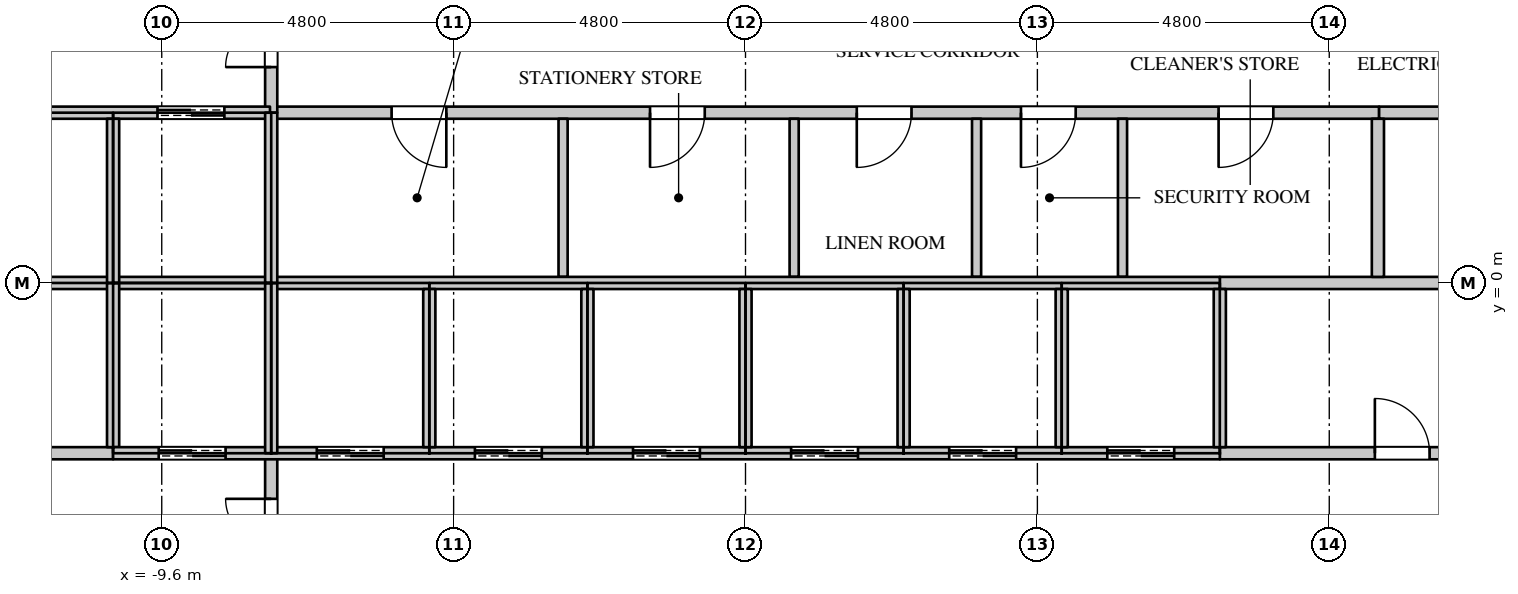
"""IFC4 building model, lengths in metres.
Left out: names, types, materials, properties, quantities, classifications, styles, units other than length and angle.
Written with IfcOpenShell. Run it as: python <this file> out.ifc"""

import sys

from ifc_helpers import new_model, si_unit, direction, frame, frame_2d, origin, place, context, subcontext, project, spatial, rectangle, extrude, element, fill, save


model = new_model("IFC4")
c1 = context("Model", 3, precision=1e-05, world=origin(), true_north=direction((0.0, 1.0)))
c2 = subcontext(c1, "Body", "Model", "MODEL_VIEW")
j1 = project(units=[si_unit("LENGTHUNIT", "METRE"), si_unit("PLANEANGLEUNIT", "RADIAN")], contexts=[c1])
p1 = place(None, origin())
s1 = spatial("IfcSite", under=j1, at=p1, CompositionType="ELEMENT")
p2 = place(p1, origin())
s2 = spatial("IfcBuilding", under=s1, at=p2, CompositionType="ELEMENT")
p3 = place(p2, frame((0.0, 0.0, 272.7)))
s3 = spatial("IfcBuildingStorey", under=s2, at=p3, CompositionType="ELEMENT", Elevation=272.7)
p4 = place(p3, frame((-7.82, 2.8, 0.0), z_axis=(0.0, 0.0, 1.0), x_axis=(1.0, 0.0, 0.0)))
e1 = element("IfcWall", 1, at=p4, inside=s3, PredefinedType="PARTITIONING", context=c2, shape_type="SweptSolid", body=[
    extrude(rectangle(XDim=18.24, YDim=0.2, at=frame_2d((9.12, 0.0))), origin(), (0.0, 0.0, 1.0), 3.95),
])
p5 = place(p4, frame((2.0, 0.0, 0.0)))
e2 = element("IfcOpeningElement", 2, at=p5, cuts=e1, PredefinedType="OPENING", context=c2, shape_type="SweptSolid", body=[
    extrude(rectangle(XDim=0.9, YDim=2.2, at=frame_2d((0.45, 1.1))), frame((0.0, 0.11, 0.0), z_axis=(0.0, -1.0, 0.0), x_axis=(1.0, 0.0, 0.0)), (0.0, 0.0, 1.0), 0.22),
])
p6 = place(p4, frame((6.25, 0.0, 0.0)))
e3 = element("IfcOpeningElement", 3, at=p6, cuts=e1, PredefinedType="OPENING", context=c2, shape_type="SweptSolid", body=[
    extrude(rectangle(XDim=0.9, YDim=2.2, at=frame_2d((0.45, 1.1))), frame((0.0, 0.11, 0.0), z_axis=(0.0, -1.0, 0.0), x_axis=(1.0, 0.0, 0.0)), (0.0, 0.0, 1.0), 0.22),
])
p7 = place(p4, frame((9.65, 0.0, 0.0)))
e4 = element("IfcOpeningElement", 4, at=p7, cuts=e1, PredefinedType="OPENING", context=c2, shape_type="SweptSolid", body=[
    extrude(rectangle(XDim=0.9, YDim=2.2, at=frame_2d((0.45, 1.1))), frame((0.0, 0.11, 0.0), z_axis=(0.0, -1.0, 0.0), x_axis=(1.0, 0.0, 0.0)), (0.0, 0.0, 1.0), 0.22),
])
p8 = place(p4, frame((12.35, 0.0, 0.0)))
e5 = element("IfcOpeningElement", 5, at=p8, cuts=e1, PredefinedType="OPENING", context=c2, shape_type="SweptSolid", body=[
    extrude(rectangle(XDim=0.9, YDim=2.2, at=frame_2d((0.45, 1.1))), frame((0.0, 0.11, 0.0), z_axis=(0.0, -1.0, 0.0), x_axis=(1.0, 0.0, 0.0)), (0.0, 0.0, 1.0), 0.22),
])
p9 = place(p4, frame((15.6, 0.0, 0.0)))
e6 = element("IfcOpeningElement", 6, at=p9, cuts=e1, PredefinedType="OPENING", context=c2, shape_type="SweptSolid", body=[
    extrude(rectangle(XDim=0.9, YDim=2.2, at=frame_2d((0.45, 1.1))), frame((0.0, 0.11, 0.0), z_axis=(0.0, -1.0, 0.0), x_axis=(1.0, 0.0, 0.0)), (0.0, 0.0, 1.0), 0.22),
])
p10 = place(p3, frame((-7.8, -5.8, 0.0), z_axis=(0.0, 0.0, 1.0), x_axis=(0.0, 1.0, 0.0)))
e7 = element("IfcWall", 7, at=p10, inside=s3, PredefinedType="PARTITIONING", context=c2, shape_type="SweptSolid", body=[
    extrude(rectangle(XDim=3.0, YDim=0.2, at=frame_2d((1.5, 0.0))), origin(), (0.0, 0.0, 1.0), 3.95),
])
p11 = place(p10, frame((0.75, 0.0, 0.0)))
e8 = element("IfcOpeningElement", 8, at=p11, cuts=e7, PredefinedType="OPENING", context=c2, shape_type="SweptSolid", body=[
    extrude(rectangle(XDim=1.5, YDim=2.4, at=frame_2d((0.75, 1.2))), frame((0.0, 0.11, 0.0), z_axis=(0.0, -1.0, 0.0), x_axis=(1.0, 0.0, 0.0)), (0.0, 0.0, 1.0), 0.22),
])
p12 = place(p3, frame((-7.8, 2.8, 0.0), z_axis=(0.0, 0.0, 1.0), x_axis=(0.0, 1.0, 0.0)))
e9 = element("IfcWall", 9, at=p12, inside=s3, PredefinedType="PARTITIONING", context=c2, shape_type="SweptSolid", body=[
    extrude(rectangle(XDim=3.0, YDim=0.2, at=frame_2d((1.5, 0.0))), origin(), (0.0, 0.0, 1.0), 3.95),
])
p13 = place(p12, frame((0.75, 0.0, 0.0)))
e10 = element("IfcOpeningElement", 10, at=p13, cuts=e9, PredefinedType="OPENING", context=c2, shape_type="SweptSolid", body=[
    extrude(rectangle(XDim=1.5, YDim=2.4, at=frame_2d((0.75, 1.2))), frame((0.0, 0.11, 0.0), z_axis=(0.0, -1.0, 0.0), x_axis=(1.0, 0.0, 0.0)), (0.0, 0.0, 1.0), 0.22),
])
for number, where, z_axis, x_axis in (
    (11, (-3.0, 0.1, 0.0), (0.0, 0.0, 1.0), (0.0, 1.0, 0.0)),
    (12, (0.8, 0.1, 0.0), (0.0, 0.0, 1.0), (0.0, 1.0, 0.0)),
    (13, (3.8, 0.1, 0.0), (0.0, 0.0, 1.0), (0.0, 1.0, 0.0)),
    (14, (6.2, 0.1, 0.0), (0.0, 0.0, 1.0), (0.0, 1.0, 0.0)),
):
    element("IfcWall", number, at=place(p3, frame(where, z_axis=z_axis, x_axis=x_axis)), inside=s3, PredefinedType="PARTITIONING", context=c2, shape_type="SweptSolid", body=[
        extrude(rectangle(XDim=2.6, YDim=0.15, at=frame_2d((1.3, 0.0))), origin(), (0.0, 0.0, 1.0), 3.95),
    ])
p14 = place(p3, frame((-13.77, -2.8, 0.0), z_axis=(0.0, 0.0, 1.0), x_axis=(1.0, 0.0, 0.0)))
e15 = element("IfcWall", 15, at=p14, inside=s3, PredefinedType="PARTITIONING", context=c2, shape_type="SweptSolid", body=[
    extrude(rectangle(XDim=3.37, YDim=0.2, at=frame_2d((1.685, 0.0))), origin(), (0.0, 0.0, 1.0), 3.95),
])
p15 = place(p14, frame((1.35, 0.0, 0.0)))
e16 = element("IfcOpeningElement", 16, at=p15, cuts=e15, PredefinedType="OPENING", context=c2, shape_type="SweptSolid", body=[
    extrude(rectangle(XDim=0.6, YDim=2.0, at=frame_2d((0.3, 1.0))), frame((0.0, 0.11, 0.0), z_axis=(0.0, -1.0, 0.0), x_axis=(1.0, 0.0, 0.0)), (0.0, 0.0, 1.0), 0.22),
])
p16 = place(p3, frame((7.8, -2.8, 0.0), z_axis=(0.0, 0.0, 1.0), x_axis=(1.0, 0.0, 0.0)))
e17 = element("IfcWall", 17, at=p16, inside=s3, PredefinedType="PARTITIONING", context=c2, shape_type="SweptSolid", body=[
    extrude(rectangle(XDim=5.97, YDim=0.2, at=frame_2d((2.985, 0.0))), origin(), (0.0, 0.0, 1.0), 3.95),
])
p17 = place(p16, frame((2.55, 0.0, 0.0)))
e18 = element("IfcOpeningElement", 18, at=p17, cuts=e17, PredefinedType="OPENING", context=c2, shape_type="SweptSolid", body=[
    extrude(rectangle(XDim=0.9, YDim=2.2, at=frame_2d((0.45, 1.1))), frame((0.0, 0.11, 0.0), z_axis=(0.0, -1.0, 0.0), x_axis=(1.0, 0.0, 0.0)), (0.0, 0.0, 1.0), 0.22),
])
p18 = place(p3, frame((7.8, 0.0, 0.0), z_axis=(0.0, 0.0, 1.0), x_axis=(1.0, 0.0, 0.0)))
e19 = element("IfcWall", 19, at=p18, inside=s3, PredefinedType="PARTITIONING", context=c2, shape_type="SweptSolid", body=[
    extrude(rectangle(XDim=5.97, YDim=0.2, at=frame_2d((2.985, 0.0))), origin(), (0.0, 0.0, 1.0), 3.95),
])
p19 = place(p3, frame((10.42, 2.8, 0.0), z_axis=(0.0, 0.0, 1.0), x_axis=(1.0, 0.0, 0.0)))
e20 = element("IfcWall", 20, at=p19, inside=s3, PredefinedType="PARTITIONING", context=c2, shape_type="SweptSolid", body=[
    extrude(rectangle(XDim=3.35, YDim=0.2, at=frame_2d((1.675, 0.0))), origin(), (0.0, 0.0, 1.0), 3.95),
])
p20 = place(p19, frame((1.35, 0.0, 0.0)))
e21 = element("IfcOpeningElement", 21, at=p20, cuts=e20, PredefinedType="OPENING", context=c2, shape_type="SweptSolid", body=[
    extrude(rectangle(XDim=0.6, YDim=2.0, at=frame_2d((0.3, 1.0))), frame((0.0, 0.11, 0.0), z_axis=(0.0, -1.0, 0.0), x_axis=(1.0, 0.0, 0.0)), (0.0, 0.0, 1.0), 0.22),
])
p21 = place(p3, frame((10.4, 0.1, 0.0), z_axis=(0.0, 0.0, 1.0), x_axis=(0.0, 1.0, 0.0)))
e22 = element("IfcWall", 22, at=p21, inside=s3, PredefinedType="PARTITIONING", context=c2, shape_type="SweptSolid", body=[
    extrude(rectangle(XDim=2.6, YDim=0.2, at=frame_2d((1.3, 0.0))), origin(), (0.0, 0.0, 1.0), 3.95),
])
p22 = place(p3, frame((-13.77, 0.0, 0.0), z_axis=(0.0, 0.0, 1.0), x_axis=(1.0, 0.0, 0.0)))
e23 = element("IfcWall", 23, at=p22, inside=s3, PredefinedType="PARTITIONING", context=c2, shape_type="SweptSolid", body=[
    extrude(rectangle(XDim=21.57, YDim=0.2, at=frame_2d((10.785, 0.0))), origin(), (0.0, 0.0, 1.0), 3.95),
])
p23 = place(p3, frame((-13.77, 2.8, 0.0), z_axis=(0.0, 0.0, 1.0), x_axis=(1.0, 0.0, 0.0)))
e24 = element("IfcWall", 24, at=p23, inside=s3, PredefinedType="PARTITIONING", context=c2, shape_type="SweptSolid", body=[
    extrude(rectangle(XDim=5.95, YDim=0.2, at=frame_2d((2.975, 0.0))), origin(), (0.0, 0.0, 1.0), 3.95),
])
p24 = place(p23, frame((1.1, 0.0, 0.0)))
e25 = element("IfcOpeningElement", 25, at=p24, cuts=e24, PredefinedType="OPENING", context=c2, shape_type="SweptSolid", body=[
    extrude(rectangle(XDim=1.1, YDim=2.2, at=frame_2d((0.55, 1.1))), frame((0.0, 0.11, 0.0), z_axis=(0.0, -1.0, 0.0), x_axis=(1.0, 0.0, 0.0)), (0.0, 0.0, 1.0), 0.22),
])
p25 = place(p23, frame((4.1, 0.0, 0.0)))
e26 = element("IfcOpeningElement", 26, at=p25, cuts=e24, PredefinedType="OPENING", context=c2, shape_type="SweptSolid", body=[
    extrude(rectangle(XDim=1.1, YDim=2.2, at=frame_2d((0.55, 1.1))), frame((0.0, 0.11, 0.0), z_axis=(0.0, -1.0, 0.0), x_axis=(1.0, 0.0, 0.0)), (0.0, 0.0, 1.0), 0.22),
])
p26 = place(p3, frame((-10.4, -2.7, 0.0), z_axis=(0.0, 0.0, 1.0), x_axis=(0.0, 1.0, 0.0)))
e27 = element("IfcWall", 27, at=p26, inside=s3, PredefinedType="PARTITIONING", context=c2, shape_type="SweptSolid", body=[
    extrude(rectangle(XDim=2.7, YDim=0.2, at=frame_2d((1.35, 0.0))), origin(), (0.0, 0.0, 1.0), 3.95),
])
p27 = place(p3, frame((-10.4, -2.8, 0.0), z_axis=(0.0, 0.0, 1.0), x_axis=(1.0, 0.0, 0.0)))
e28 = element("IfcWall", 28, at=p27, inside=s3, PredefinedType="PARTITIONING", context=c2, shape_type="SweptSolid", body=[
    extrude(rectangle(XDim=18.2, YDim=0.2, at=frame_2d((9.1, 0.0))), origin(), (0.0, 0.0, 1.0), 3.95),
])
p28 = place(p27, frame((0.75, 0.0, 0.0)))
e29 = element("IfcOpeningElement", 29, at=p28, cuts=e28, PredefinedType="OPENING", context=c2, shape_type="SweptSolid", body=[
    extrude(rectangle(XDim=1.1, YDim=2.2, at=frame_2d((0.55, 1.1))), frame((0.0, 0.11, 0.0), z_axis=(0.0, -1.0, 0.0), x_axis=(1.0, 0.0, 0.0)), (0.0, 0.0, 1.0), 0.22),
])
p29 = place(p27, frame((3.35, 0.0, 0.0)))
e30 = element("IfcOpeningElement", 30, at=p29, cuts=e28, PredefinedType="OPENING", context=c2, shape_type="SweptSolid", body=[
    extrude(rectangle(XDim=1.1, YDim=2.2, at=frame_2d((0.55, 1.1))), frame((0.0, 0.11, 0.0), z_axis=(0.0, -1.0, 0.0), x_axis=(1.0, 0.0, 0.0)), (0.0, 0.0, 1.0), 0.22),
])
p30 = place(p27, frame((5.95, 0.0, 0.0)))
e31 = element("IfcOpeningElement", 31, at=p30, cuts=e28, PredefinedType="OPENING", context=c2, shape_type="SweptSolid", body=[
    extrude(rectangle(XDim=1.1, YDim=2.2, at=frame_2d((0.55, 1.1))), frame((0.0, 0.11, 0.0), z_axis=(0.0, -1.0, 0.0), x_axis=(1.0, 0.0, 0.0)), (0.0, 0.0, 1.0), 0.22),
])
p31 = place(p27, frame((8.55, 0.0, 0.0)))
e32 = element("IfcOpeningElement", 32, at=p31, cuts=e28, PredefinedType="OPENING", context=c2, shape_type="SweptSolid", body=[
    extrude(rectangle(XDim=1.1, YDim=2.2, at=frame_2d((0.55, 1.1))), frame((0.0, 0.11, 0.0), z_axis=(0.0, -1.0, 0.0), x_axis=(1.0, 0.0, 0.0)), (0.0, 0.0, 1.0), 0.22),
])
p32 = place(p27, frame((11.15, 0.0, 0.0)))
e33 = element("IfcOpeningElement", 33, at=p32, cuts=e28, PredefinedType="OPENING", context=c2, shape_type="SweptSolid", body=[
    extrude(rectangle(XDim=1.1, YDim=2.2, at=frame_2d((0.55, 1.1))), frame((0.0, 0.11, 0.0), z_axis=(0.0, -1.0, 0.0), x_axis=(1.0, 0.0, 0.0)), (0.0, 0.0, 1.0), 0.22),
])
p33 = place(p27, frame((13.75, 0.0, 0.0)))
e34 = element("IfcOpeningElement", 34, at=p33, cuts=e28, PredefinedType="OPENING", context=c2, shape_type="SweptSolid", body=[
    extrude(rectangle(XDim=1.1, YDim=2.2, at=frame_2d((0.55, 1.1))), frame((0.0, 0.11, 0.0), z_axis=(0.0, -1.0, 0.0), x_axis=(1.0, 0.0, 0.0)), (0.0, 0.0, 1.0), 0.22),
])
p34 = place(p27, frame((16.35, 0.0, 0.0)))
e35 = element("IfcOpeningElement", 35, at=p34, cuts=e28, PredefinedType="OPENING", context=c2, shape_type="SweptSolid", body=[
    extrude(rectangle(XDim=1.1, YDim=2.2, at=frame_2d((0.55, 1.1))), frame((0.0, 0.11, 0.0), z_axis=(0.0, -1.0, 0.0), x_axis=(1.0, 0.0, 0.0)), (0.0, 0.0, 1.0), 0.22),
])
p35 = place(p3, frame((-10.4, 0.0, 0.0), z_axis=(0.0, 0.0, 1.0), x_axis=(0.0, 1.0, 0.0)))
e36 = element("IfcWall", 36, at=p35, inside=s3, PredefinedType="PARTITIONING", context=c2, shape_type="SweptSolid", body=[
    extrude(rectangle(XDim=2.7, YDim=0.2, at=frame_2d((1.35, 0.0))), origin(), (0.0, 0.0, 1.0), 3.95),
])
for number, where, z_axis, x_axis in (
    (37, (-7.8, -2.8, 0.0), (0.0, 0.0, 1.0), (0.0, 1.0, 0.0)),
    (38, (-7.8, 0.0, 0.0), (0.0, 0.0, 1.0), (0.0, 1.0, 0.0)),
):
    element("IfcWall", number, at=place(p3, frame(where, z_axis=z_axis, x_axis=x_axis)), inside=s3, PredefinedType="PARTITIONING", context=c2, shape_type="SweptSolid", body=[
        extrude(rectangle(XDim=2.8, YDim=0.2, at=frame_2d((1.4, 0.0))), origin(), (0.0, 0.0, 1.0), 3.95),
    ])
for number, where, z_axis, x_axis in (
    (39, (-5.2, -2.7, 0.0), (0.0, 0.0, 1.0), (0.0, 1.0, 0.0)),
    (40, (-2.6, -2.7, 0.0), (0.0, 0.0, 1.0), (0.0, 1.0, 0.0)),
    (41, (0.0, -2.7, 0.0), (0.0, 0.0, 1.0), (0.0, 1.0, 0.0)),
    (42, (2.6, -2.7, 0.0), (0.0, 0.0, 1.0), (0.0, 1.0, 0.0)),
    (43, (5.2, -2.7, 0.0), (0.0, 0.0, 1.0), (0.0, 1.0, 0.0)),
    (44, (7.8, -2.7, 0.0), (0.0, 0.0, 1.0), (0.0, 1.0, 0.0)),
):
    element("IfcWall", number, at=place(p3, frame(where, z_axis=z_axis, x_axis=x_axis)), inside=s3, PredefinedType="PARTITIONING", context=c2, shape_type="SweptSolid", body=[
        extrude(rectangle(XDim=2.6, YDim=0.2, at=frame_2d((1.3, 0.0))), origin(), (0.0, 0.0, 1.0), 3.95),
    ])
p36 = place(p17, origin())
e45 = element("IfcDoor", 45, at=p36, inside=s3, OperationType="SINGLE_SWING_LEFT", PredefinedType="DOOR", context=c2, shape_type="SweptSolid", body=[
    extrude(rectangle(XDim=0.9, YDim=2.2, at=frame_2d((0.45, 1.1))), frame((0.0, 0.025, 0.0), z_axis=(0.0, -1.0, 0.0), x_axis=(1.0, 0.0, 0.0)), (0.0, 0.0, 1.0), 0.05),
])
fill(e18, e45)
p37 = place(p5, origin())
e46 = element("IfcDoor", 46, at=p37, inside=s3, OperationType="SINGLE_SWING_LEFT", PredefinedType="DOOR", context=c2, shape_type="SweptSolid", body=[
    extrude(rectangle(XDim=0.9, YDim=2.2, at=frame_2d((0.45, 1.1))), frame((0.0, 0.025, 0.0), z_axis=(0.0, -1.0, 0.0), x_axis=(1.0, 0.0, 0.0)), (0.0, 0.0, 1.0), 0.05),
])
fill(e2, e46)
p38 = place(p6, origin())
e47 = element("IfcDoor", 47, at=p38, inside=s3, OperationType="SINGLE_SWING_RIGHT", PredefinedType="DOOR", context=c2, shape_type="SweptSolid", body=[
    extrude(rectangle(XDim=0.9, YDim=2.2, at=frame_2d((0.45, 1.1))), frame((0.0, 0.025, 0.0), z_axis=(0.0, -1.0, 0.0), x_axis=(1.0, 0.0, 0.0)), (0.0, 0.0, 1.0), 0.05),
])
fill(e3, e47)
p39 = place(p7, origin())
e48 = element("IfcDoor", 48, at=p39, inside=s3, OperationType="SINGLE_SWING_RIGHT", PredefinedType="DOOR", context=c2, shape_type="SweptSolid", body=[
    extrude(rectangle(XDim=0.9, YDim=2.2, at=frame_2d((0.45, 1.1))), frame((0.0, 0.025, 0.0), z_axis=(0.0, -1.0, 0.0), x_axis=(1.0, 0.0, 0.0)), (0.0, 0.0, 1.0), 0.05),
])
fill(e4, e48)
p40 = place(p8, origin())
e49 = element("IfcDoor", 49, at=p40, inside=s3, OperationType="SINGLE_SWING_RIGHT", PredefinedType="DOOR", context=c2, shape_type="SweptSolid", body=[
    extrude(rectangle(XDim=0.9, YDim=2.2, at=frame_2d((0.45, 1.1))), frame((0.0, 0.025, 0.0), z_axis=(0.0, -1.0, 0.0), x_axis=(1.0, 0.0, 0.0)), (0.0, 0.0, 1.0), 0.05),
])
fill(e5, e49)
p41 = place(p9, origin())
e50 = element("IfcDoor", 50, at=p41, inside=s3, OperationType="SINGLE_SWING_RIGHT", PredefinedType="DOOR", context=c2, shape_type="SweptSolid", body=[
    extrude(rectangle(XDim=0.9, YDim=2.2, at=frame_2d((0.45, 1.1))), frame((0.0, 0.025, 0.0), z_axis=(0.0, -1.0, 0.0), x_axis=(1.0, 0.0, 0.0)), (0.0, 0.0, 1.0), 0.05),
])
fill(e6, e50)
p42 = place(p25, origin())
e51 = element("IfcDoor", 51, at=p42, inside=s3, OperationType="DOUBLE_DOOR_SLIDING", PredefinedType="DOOR", context=c2, shape_type="SweptSolid", body=[
    extrude(rectangle(XDim=1.1, YDim=2.2, at=frame_2d((0.55, 1.1))), frame((0.0, 0.025, 0.0), z_axis=(0.0, -1.0, 0.0), x_axis=(1.0, 0.0, 0.0)), (0.0, 0.0, 1.0), 0.05),
])
fill(e26, e51)
p43 = place(p28, origin())
e52 = element("IfcDoor", 52, at=p43, inside=s3, OperationType="DOUBLE_DOOR_SLIDING", PredefinedType="DOOR", context=c2, shape_type="SweptSolid", body=[
    extrude(rectangle(XDim=1.1, YDim=2.2, at=frame_2d((0.55, 1.1))), frame((0.0, 0.025, 0.0), z_axis=(0.0, -1.0, 0.0), x_axis=(1.0, 0.0, 0.0)), (0.0, 0.0, 1.0), 0.05),
])
fill(e29, e52)
p44 = place(p29, origin())
e53 = element("IfcDoor", 53, at=p44, inside=s3, OperationType="DOUBLE_DOOR_SLIDING", PredefinedType="DOOR", context=c2, shape_type="SweptSolid", body=[
    extrude(rectangle(XDim=1.1, YDim=2.2, at=frame_2d((0.55, 1.1))), frame((0.0, 0.025, 0.0), z_axis=(0.0, -1.0, 0.0), x_axis=(1.0, 0.0, 0.0)), (0.0, 0.0, 1.0), 0.05),
])
fill(e30, e53)
p45 = place(p30, origin())
e54 = element("IfcDoor", 54, at=p45, inside=s3, OperationType="DOUBLE_DOOR_SLIDING", PredefinedType="DOOR", context=c2, shape_type="SweptSolid", body=[
    extrude(rectangle(XDim=1.1, YDim=2.2, at=frame_2d((0.55, 1.1))), frame((0.0, 0.025, 0.0), z_axis=(0.0, -1.0, 0.0), x_axis=(1.0, 0.0, 0.0)), (0.0, 0.0, 1.0), 0.05),
])
fill(e31, e54)
p46 = place(p31, origin())
e55 = element("IfcDoor", 55, at=p46, inside=s3, OperationType="DOUBLE_DOOR_SLIDING", PredefinedType="DOOR", context=c2, shape_type="SweptSolid", body=[
    extrude(rectangle(XDim=1.1, YDim=2.2, at=frame_2d((0.55, 1.1))), frame((0.0, 0.025, 0.0), z_axis=(0.0, -1.0, 0.0), x_axis=(1.0, 0.0, 0.0)), (0.0, 0.0, 1.0), 0.05),
])
fill(e32, e55)
p47 = place(p32, origin())
e56 = element("IfcDoor", 56, at=p47, inside=s3, OperationType="DOUBLE_DOOR_SLIDING", PredefinedType="DOOR", context=c2, shape_type="SweptSolid", body=[
    extrude(rectangle(XDim=1.1, YDim=2.2, at=frame_2d((0.55, 1.1))), frame((0.0, 0.025, 0.0), z_axis=(0.0, -1.0, 0.0), x_axis=(1.0, 0.0, 0.0)), (0.0, 0.0, 1.0), 0.05),
])
fill(e33, e56)
p48 = place(p33, origin())
e57 = element("IfcDoor", 57, at=p48, inside=s3, OperationType="DOUBLE_DOOR_SLIDING", PredefinedType="DOOR", context=c2, shape_type="SweptSolid", body=[
    extrude(rectangle(XDim=1.1, YDim=2.2, at=frame_2d((0.55, 1.1))), frame((0.0, 0.025, 0.0), z_axis=(0.0, -1.0, 0.0), x_axis=(1.0, 0.0, 0.0)), (0.0, 0.0, 1.0), 0.05),
])
fill(e34, e57)
p49 = place(p34, origin())
e58 = element("IfcDoor", 58, at=p49, inside=s3, OperationType="DOUBLE_DOOR_SLIDING", PredefinedType="DOOR", context=c2, shape_type="SweptSolid", body=[
    extrude(rectangle(XDim=1.1, YDim=2.2, at=frame_2d((0.55, 1.1))), frame((0.0, 0.025, 0.0), z_axis=(0.0, -1.0, 0.0), x_axis=(1.0, 0.0, 0.0)), (0.0, 0.0, 1.0), 0.05),
])
fill(e35, e58)
p50 = place(p13, origin())
e59 = element("IfcDoor", 59, at=p50, inside=s3, OperationType="DOUBLE_DOOR_SINGLE_SWING", PredefinedType="DOOR", context=c2, shape_type="SweptSolid", body=[
    extrude(rectangle(XDim=1.5, YDim=2.4, at=frame_2d((0.75, 1.2))), frame((0.0, 0.025, 0.0), z_axis=(0.0, -1.0, 0.0), x_axis=(1.0, 0.0, 0.0)), (0.0, 0.0, 1.0), 0.05),
])
fill(e10, e59)
p51 = place(p11, origin())
e60 = element("IfcDoor", 60, at=p51, inside=s3, OperationType="DOUBLE_DOOR_SINGLE_SWING", PredefinedType="DOOR", context=c2, shape_type="SweptSolid", body=[
    extrude(rectangle(XDim=1.5, YDim=2.4, at=frame_2d((0.75, 1.2))), frame((0.0, 0.025, 0.0), z_axis=(0.0, -1.0, 0.0), x_axis=(1.0, 0.0, 0.0)), (0.0, 0.0, 1.0), 0.05),
])
fill(e8, e60)
save(model, sys.argv[1])
